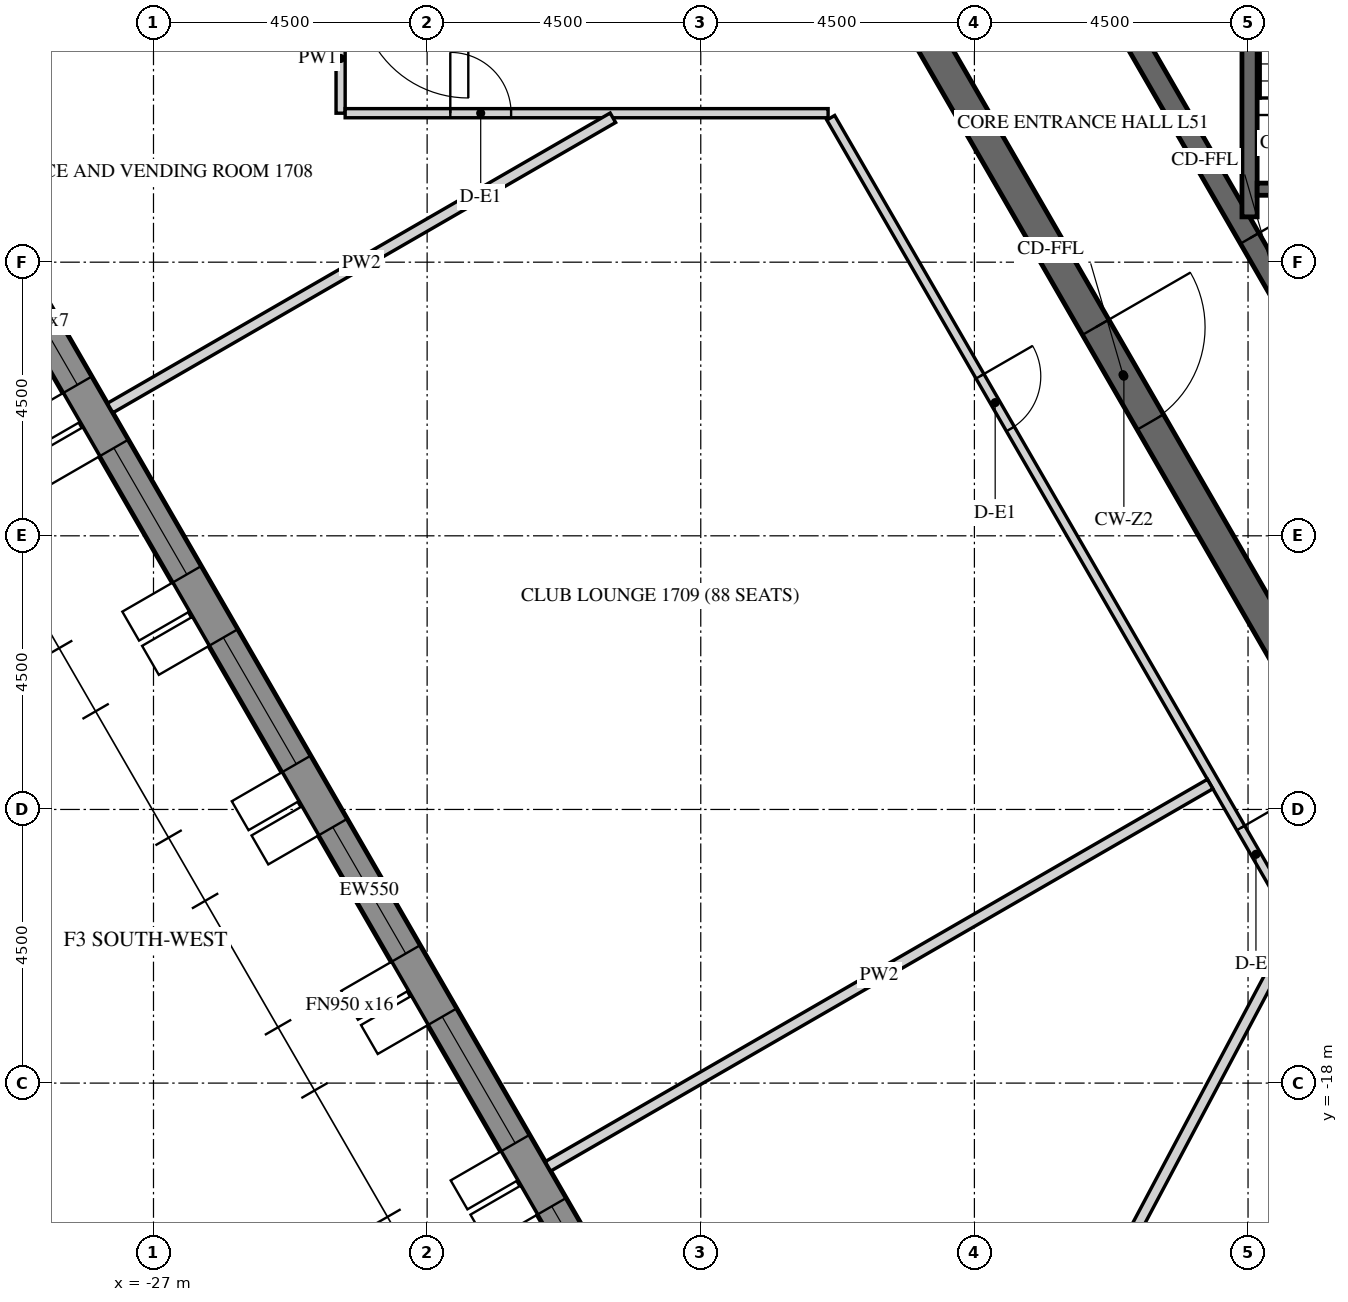
"""IFC4 building model, lengths in metres.
Left out: names, types, materials, properties, quantities, classifications, styles, units other than length and angle.
Written with IfcOpenShell. Run it as: python <this file> out.ifc"""

import sys

from ifc_helpers import new_model, si_unit, direction, frame, frame_2d, origin, place, context, subcontext, project, spatial, polyline, rectangle, outline, extrude, element, fill, save


model = new_model("IFC4")
c1 = context("Model", 3, precision=1e-05, world=origin(), true_north=direction((0.0, 1.0)))
c2 = subcontext(c1, "Body", "Model", "MODEL_VIEW")
j1 = project(units=[si_unit("LENGTHUNIT", "METRE"), si_unit("PLANEANGLEUNIT", "RADIAN")], contexts=[c1])
p1 = place(None, origin())
s1 = spatial("IfcSite", under=j1, at=p1, CompositionType="ELEMENT")
p2 = place(p1, origin())
s2 = spatial("IfcBuilding", under=s1, at=p2, CompositionType="ELEMENT")
p3 = place(p2, frame((0.0, 0.0, 215.1)))
s3 = spatial("IfcBuildingStorey", under=s2, at=p3, CompositionType="ELEMENT", Elevation=215.1)
p4 = place(p3, frame((-30.391, -2.811, -0.15), z_axis=(0.0, 0.0, 1.0), x_axis=(0.499998569178, -0.866026229868, 0.0)))
e1 = element("IfcWall", 1, at=p4, inside=s3, PredefinedType="SOLIDWALL", context=c2, shape_type="SweptSolid", body=[
    extrude(outline(polyline([(-0.022, -0.275), (27.783, -0.275), (27.732, 0.275), (0.022, 0.275), (-0.022, -0.275)])), origin(), (0.0, 0.0, 1.0), 3.9),
])
p5 = place(p4, frame((1.879, 0.0, 1.05)))
e2 = element("IfcOpeningElement", 2, at=p5, cuts=e1, PredefinedType="OPENING", context=c2, shape_type="SweptSolid", body=[
    extrude(rectangle(XDim=2.4, YDim=2.4, at=frame_2d((1.2, 1.2))), frame((0.0, 0.285, 0.0), z_axis=(0.0, -1.0, 0.0), x_axis=(1.0, 0.0, 0.0)), (0.0, 0.0, 1.0), 0.57),
])
p6 = place(p4, frame((5.479, 0.0, 1.05)))
e3 = element("IfcOpeningElement", 3, at=p6, cuts=e1, PredefinedType="OPENING", context=c2, shape_type="SweptSolid", body=[
    extrude(rectangle(XDim=2.4, YDim=2.4, at=frame_2d((1.2, 1.2))), frame((0.0, 0.285, 0.0), z_axis=(0.0, -1.0, 0.0), x_axis=(1.0, 0.0, 0.0)), (0.0, 0.0, 1.0), 0.57),
])
p7 = place(p4, frame((9.079, 0.0, 1.05)))
e4 = element("IfcOpeningElement", 4, at=p7, cuts=e1, PredefinedType="OPENING", context=c2, shape_type="SweptSolid", body=[
    extrude(rectangle(XDim=2.4, YDim=2.4, at=frame_2d((1.2, 1.2))), frame((0.0, 0.285, 0.0), z_axis=(0.0, -1.0, 0.0), x_axis=(1.0, 0.0, 0.0)), (0.0, 0.0, 1.0), 0.57),
])
p8 = place(p4, frame((12.679, 0.0, 1.05)))
e5 = element("IfcOpeningElement", 5, at=p8, cuts=e1, PredefinedType="OPENING", context=c2, shape_type="SweptSolid", body=[
    extrude(rectangle(XDim=2.4, YDim=2.4, at=frame_2d((1.2, 1.2))), frame((0.0, 0.285, 0.0), z_axis=(0.0, -1.0, 0.0), x_axis=(1.0, 0.0, 0.0)), (0.0, 0.0, 1.0), 0.57),
])
p9 = place(p4, frame((16.279, 0.0, 1.05)))
e6 = element("IfcOpeningElement", 6, at=p9, cuts=e1, PredefinedType="OPENING", context=c2, shape_type="SweptSolid", body=[
    extrude(rectangle(XDim=2.4, YDim=2.4, at=frame_2d((1.2, 1.2))), frame((0.0, 0.285, 0.0), z_axis=(0.0, -1.0, 0.0), x_axis=(1.0, 0.0, 0.0)), (0.0, 0.0, 1.0), 0.57),
])
p10 = place(p4, frame((19.879, 0.0, 1.05)))
e7 = element("IfcOpeningElement", 7, at=p10, cuts=e1, PredefinedType="OPENING", context=c2, shape_type="SweptSolid", body=[
    extrude(rectangle(XDim=2.4, YDim=2.4, at=frame_2d((1.2, 1.2))), frame((0.0, 0.285, 0.0), z_axis=(0.0, -1.0, 0.0), x_axis=(1.0, 0.0, 0.0)), (0.0, 0.0, 1.0), 0.57),
])
p11 = place(p4, frame((23.479, 0.0, 1.05)))
e8 = element("IfcOpeningElement", 8, at=p11, cuts=e1, PredefinedType="OPENING", context=c2, shape_type="SweptSolid", body=[
    extrude(rectangle(XDim=2.4, YDim=2.4, at=frame_2d((1.2, 1.2))), frame((0.0, 0.285, 0.0), z_axis=(0.0, -1.0, 0.0), x_axis=(1.0, 0.0, 0.0)), (0.0, 0.0, 1.0), 0.57),
])
p12 = place(p3, frame((-14.722, 0.0, -0.15), z_axis=(0.0, 0.0, 1.0), x_axis=(0.50000571537, -0.866022103989, 0.0)))
e9 = element("IfcWall", 9, at=p12, inside=s3, PredefinedType="SHEAR", context=c2, shape_type="SweptSolid", body=[
    extrude(outline(polyline([(-0.144, -0.25), (14.867, -0.25), (14.578, 0.25), (0.144, 0.25), (-0.144, -0.25)])), origin(), (0.0, 0.0, 1.0), 3.9),
])
p13 = place(p12, frame((6.432, 0.0, 0.15)))
e10 = element("IfcOpeningElement", 10, at=p13, cuts=e9, PredefinedType="OPENING", context=c2, shape_type="SweptSolid", body=[
    extrude(rectangle(XDim=1.8, YDim=2.4, at=frame_2d((0.9, 1.2))), frame((0.0, 0.26, 0.0), z_axis=(0.0, -1.0, 0.0), x_axis=(1.0, 0.0, 0.0)), (0.0, 0.0, 1.0), 0.52),
])
p14 = place(p3, frame((-11.345, 0.0, -0.15), z_axis=(0.0, 0.0, 1.0), x_axis=(0.499995046907, -0.866028263435, 0.0)))
e11 = element("IfcWall", 11, at=p14, inside=s3, PredefinedType="SHEAR", context=c2, shape_type="SweptSolid", body=[
    extrude(outline(polyline([(-0.101, -0.175), (11.446, -0.175), (11.244, 0.175), (0.101, 0.175), (-0.101, -0.175)])), origin(), (0.0, 0.0, 1.0), 3.9),
])
p15 = place(p14, frame((4.744, 0.0, 0.15)))
e12 = element("IfcOpeningElement", 12, at=p15, cuts=e11, PredefinedType="OPENING", context=c2, shape_type="SweptSolid", body=[
    extrude(rectangle(XDim=1.8, YDim=2.4, at=frame_2d((0.9, 1.2))), frame((0.0, 0.185, 0.0), z_axis=(0.0, -1.0, 0.0), x_axis=(1.0, 0.0, 0.0)), (0.0, 0.0, 1.0), 0.37),
])
p16 = place(p3, frame((-8.975, -3.755, -0.25), z_axis=(0.0, 0.0, 1.0), x_axis=(0.0, 1.0, 0.0)))
e13 = element("IfcWall", 13, at=p16, inside=s3, PredefinedType="SHEAR", context=c2, shape_type="SweptSolid", body=[
    extrude(rectangle(XDim=7.51, YDim=0.25, at=frame_2d((3.755, 0.0))), origin(), (0.0, 0.0, 1.0), 3.9),
])
p17 = place(p3, frame((-8.85, -3.3, -0.25), z_axis=(0.0, 0.0, 1.0), x_axis=(1.0, 0.0, 0.0)))
e14 = element("IfcWall", 14, at=p17, inside=s3, PredefinedType="SHEAR", context=c2, shape_type="SweptSolid", body=[
    extrude(rectangle(XDim=2.95, YDim=0.2, at=frame_2d((1.475, 0.0))), origin(), (0.0, 0.0, 1.0), 3.9),
])
p18 = place(p17, frame((0.875, 0.0, 0.25)))
e15 = element("IfcOpeningElement", 15, at=p18, cuts=e14, PredefinedType="OPENING", context=c2, shape_type="SweptSolid", body=[
    extrude(rectangle(XDim=1.2, YDim=2.4, at=frame_2d((0.6, 1.2))), frame((0.0, 0.11, 0.0), z_axis=(0.0, -1.0, 0.0), x_axis=(1.0, 0.0, 0.0)), (0.0, 0.0, 1.0), 0.22),
])
p19 = place(p3, frame((-23.923, -0.25, 0.0), z_axis=(0.0, 0.0, 1.0), x_axis=(0.0, -1.0, 0.0)))
e16 = element("IfcWall", 16, at=p19, inside=s3, PredefinedType="PARTITIONING", context=c2, shape_type="SweptSolid", body=[
    extrude(rectangle(XDim=1.8, YDim=0.15, at=frame_2d((0.9, 0.0))), origin(), (0.0, 0.0, 1.0), 2.988),
])
p20 = place(p3, frame((-23.848, -2.05, 0.0), z_axis=(0.0, 0.0, 1.0), x_axis=(1.0, 0.0, 0.0)))
e17 = element("IfcWall", 17, at=p20, inside=s3, PredefinedType="PARTITIONING", context=c2, shape_type="SweptSolid", body=[
    extrude(rectangle(XDim=7.942, YDim=0.15, at=frame_2d((3.971, 0.0))), origin(), (0.0, 0.0, 1.0), 2.988),
])
p21 = place(p20, frame((1.729, 0.0, 0.0)))
e18 = element("IfcOpeningElement", 18, at=p21, cuts=e17, PredefinedType="OPENING", context=c2, shape_type="SweptSolid", body=[
    extrude(rectangle(XDim=1.0, YDim=2.1, at=frame_2d((0.5, 1.05))), frame((0.0, 0.085, 0.0), z_axis=(0.0, -1.0, 0.0), x_axis=(1.0, 0.0, 0.0)), (0.0, 0.0, 1.0), 0.17),
])
p22 = place(p3, frame((-15.863, -2.125, 0.0), z_axis=(0.0, 0.0, 1.0), x_axis=(0.500008833422, -0.866020303746, 0.0)))
e19 = element("IfcWall", 19, at=p22, inside=s3, PredefinedType="PARTITIONING", context=c2, shape_type="SweptSolid", body=[
    extrude(rectangle(XDim=14.636, YDim=0.15, at=frame_2d((7.318, 0.0))), origin(), (0.0, 0.0, 1.0), 2.988),
])
p23 = place(p22, frame((4.909, 0.0, 0.0)))
e20 = element("IfcOpeningElement", 20, at=p23, cuts=e19, PredefinedType="OPENING", context=c2, shape_type="SweptSolid", body=[
    extrude(rectangle(XDim=1.0, YDim=2.1, at=frame_2d((0.5, 1.05))), frame((0.0, 0.085, 0.0), z_axis=(0.0, -1.0, 0.0), x_axis=(1.0, 0.0, 0.0)), (0.0, 0.0, 1.0), 0.17),
])
p24 = place(p22, frame((13.486, 0.0, 0.0)))
e21 = element("IfcOpeningElement", 21, at=p24, cuts=e19, PredefinedType="OPENING", context=c2, shape_type="SweptSolid", body=[
    extrude(rectangle(XDim=1.0, YDim=2.1, at=frame_2d((0.5, 1.05))), frame((0.0, 0.085, 0.0), z_axis=(0.0, -1.0, 0.0), x_axis=(1.0, 0.0, 0.0)), (0.0, 0.0, 1.0), 0.17),
])
p25 = place(p3, frame((-27.713, -6.899, 0.0), z_axis=(0.0, 0.0, 1.0), x_axis=(0.866022070066, 0.500005774125, 0.0)))
e22 = element("IfcWall", 22, at=p25, inside=s3, PredefinedType="PARTITIONING", context=c2, shape_type="SweptSolid", body=[
    extrude(rectangle(XDim=9.548, YDim=0.18, at=frame_2d((4.774, 0.0))), origin(), (0.0, 0.0, 1.0), 2.988),
])
p26 = place(p3, frame((-20.513, -19.37, 0.0), z_axis=(0.0, 0.0, 1.0), x_axis=(0.866019402111, 0.500010395058, 0.0)))
e23 = element("IfcWall", 23, at=p26, inside=s3, PredefinedType="PARTITIONING", context=c2, shape_type="SweptSolid", body=[
    extrude(rectangle(XDim=12.575, YDim=0.18, at=frame_2d((6.288, 0.0))), origin(), (0.0, 0.0, 1.0), 2.988),
])
p27 = place(p3, frame((-14.876, -27.977, 0.0), z_axis=(0.0, 0.0, 1.0), x_axis=(0.469475175214, 0.882945672088, 0.0)))
e24 = element("IfcWall", 24, at=p27, inside=s3, PredefinedType="PARTITIONING", context=c2, shape_type="SweptSolid", body=[
    extrude(rectangle(XDim=14.839, YDim=0.18, at=frame_2d((7.419, 0.0))), origin(), (0.0, 0.0, 1.0), 2.988),
])
p28 = place(p5, frame((0.0, 0.205, 0.0)))
e25 = element("IfcWindow", 25, at=p28, inside=s3, PartitioningType="DOUBLE_PANEL_VERTICAL", PredefinedType="WINDOW", context=c2, shape_type="SweptSolid", body=[
    extrude(rectangle(XDim=2.4, YDim=2.4, at=frame_2d((1.2, 1.2))), frame((0.0, 0.03, 0.0), z_axis=(0.0, -1.0, 0.0), x_axis=(1.0, 0.0, 0.0)), (0.0, 0.0, 1.0), 0.06),
])
fill(e2, e25)
p29 = place(p6, frame((0.0, 0.205, 0.0)))
e26 = element("IfcWindow", 26, at=p29, inside=s3, PartitioningType="DOUBLE_PANEL_VERTICAL", PredefinedType="WINDOW", context=c2, shape_type="SweptSolid", body=[
    extrude(rectangle(XDim=2.4, YDim=2.4, at=frame_2d((1.2, 1.2))), frame((0.0, 0.03, 0.0), z_axis=(0.0, -1.0, 0.0), x_axis=(1.0, 0.0, 0.0)), (0.0, 0.0, 1.0), 0.06),
])
fill(e3, e26)
p30 = place(p7, frame((0.0, 0.205, 0.0)))
e27 = element("IfcWindow", 27, at=p30, inside=s3, PartitioningType="DOUBLE_PANEL_VERTICAL", PredefinedType="WINDOW", context=c2, shape_type="SweptSolid", body=[
    extrude(rectangle(XDim=2.4, YDim=2.4, at=frame_2d((1.2, 1.2))), frame((0.0, 0.03, 0.0), z_axis=(0.0, -1.0, 0.0), x_axis=(1.0, 0.0, 0.0)), (0.0, 0.0, 1.0), 0.06),
])
fill(e4, e27)
p31 = place(p8, frame((0.0, 0.205, 0.0)))
e28 = element("IfcWindow", 28, at=p31, inside=s3, PartitioningType="DOUBLE_PANEL_VERTICAL", PredefinedType="WINDOW", context=c2, shape_type="SweptSolid", body=[
    extrude(rectangle(XDim=2.4, YDim=2.4, at=frame_2d((1.2, 1.2))), frame((0.0, 0.03, 0.0), z_axis=(0.0, -1.0, 0.0), x_axis=(1.0, 0.0, 0.0)), (0.0, 0.0, 1.0), 0.06),
])
fill(e5, e28)
p32 = place(p9, frame((0.0, 0.205, 0.0)))
e29 = element("IfcWindow", 29, at=p32, inside=s3, PartitioningType="DOUBLE_PANEL_VERTICAL", PredefinedType="WINDOW", context=c2, shape_type="SweptSolid", body=[
    extrude(rectangle(XDim=2.4, YDim=2.4, at=frame_2d((1.2, 1.2))), frame((0.0, 0.03, 0.0), z_axis=(0.0, -1.0, 0.0), x_axis=(1.0, 0.0, 0.0)), (0.0, 0.0, 1.0), 0.06),
])
fill(e6, e29)
p33 = place(p10, frame((0.0, 0.205, 0.0)))
e30 = element("IfcWindow", 30, at=p33, inside=s3, PartitioningType="DOUBLE_PANEL_VERTICAL", PredefinedType="WINDOW", context=c2, shape_type="SweptSolid", body=[
    extrude(rectangle(XDim=2.4, YDim=2.4, at=frame_2d((1.2, 1.2))), frame((0.0, 0.03, 0.0), z_axis=(0.0, -1.0, 0.0), x_axis=(1.0, 0.0, 0.0)), (0.0, 0.0, 1.0), 0.06),
])
fill(e7, e30)
p34 = place(p13, origin())
e31 = element("IfcDoor", 31, at=p34, inside=s3, OperationType="DOUBLE_DOOR_SINGLE_SWING", PredefinedType="DOOR", context=c2, shape_type="SweptSolid", body=[
    extrude(rectangle(XDim=1.8, YDim=2.4, at=frame_2d((0.9, 1.2))), frame((0.0, 0.025, 0.0), z_axis=(0.0, -1.0, 0.0), x_axis=(1.0, 0.0, 0.0)), (0.0, 0.0, 1.0), 0.05),
])
fill(e10, e31)
p35 = place(p15, origin())
e32 = element("IfcDoor", 32, at=p35, inside=s3, OperationType="DOUBLE_DOOR_SINGLE_SWING", PredefinedType="DOOR", context=c2, shape_type="SweptSolid", body=[
    extrude(rectangle(XDim=1.8, YDim=2.4, at=frame_2d((0.9, 1.2))), frame((0.0, 0.025, 0.0), z_axis=(0.0, -1.0, 0.0), x_axis=(1.0, 0.0, 0.0)), (0.0, 0.0, 1.0), 0.05),
])
fill(e12, e32)
p36 = place(p21, origin())
e33 = element("IfcDoor", 33, at=p36, inside=s3, OperationType="SINGLE_SWING_RIGHT", PredefinedType="DOOR", context=c2, shape_type="SweptSolid", body=[
    extrude(rectangle(XDim=1.0, YDim=2.1, at=frame_2d((0.5, 1.05))), frame((0.0, 0.025, 0.0), z_axis=(0.0, -1.0, 0.0), x_axis=(1.0, 0.0, 0.0)), (0.0, 0.0, 1.0), 0.05),
])
fill(e18, e33)
p37 = place(p23, origin())
e34 = element("IfcDoor", 34, at=p37, inside=s3, OperationType="SINGLE_SWING_RIGHT", PredefinedType="DOOR", context=c2, shape_type="SweptSolid", body=[
    extrude(rectangle(XDim=1.0, YDim=2.1, at=frame_2d((0.5, 1.05))), frame((0.0, 0.025, 0.0), z_axis=(0.0, -1.0, 0.0), x_axis=(1.0, 0.0, 0.0)), (0.0, 0.0, 1.0), 0.05),
])
fill(e20, e34)
p38 = place(p24, origin())
e35 = element("IfcDoor", 35, at=p38, inside=s3, OperationType="SINGLE_SWING_LEFT", PredefinedType="DOOR", context=c2, shape_type="SweptSolid", body=[
    extrude(rectangle(XDim=1.0, YDim=2.1, at=frame_2d((0.5, 1.05))), frame((0.0, 0.025, 0.0), z_axis=(0.0, -1.0, 0.0), x_axis=(1.0, 0.0, 0.0)), (0.0, 0.0, 1.0), 0.05),
])
fill(e21, e35)
save(model, sys.argv[1])
